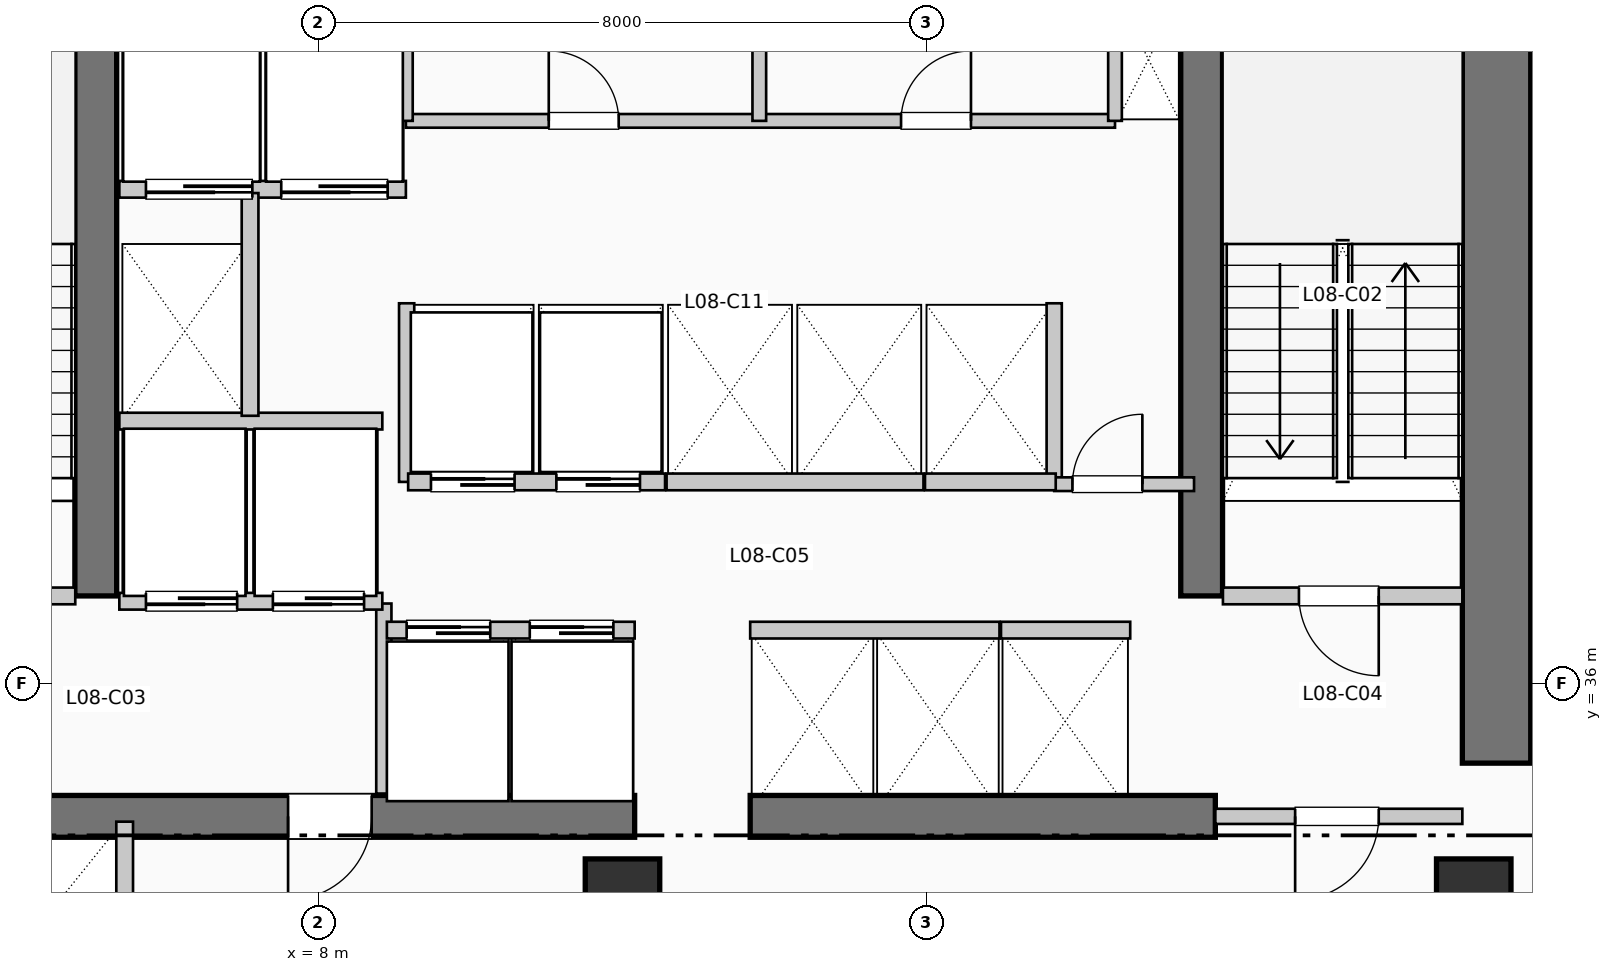
"""IFC4 building model, lengths in metres.
Left out: names, types, materials, properties, quantities, classifications, styles, units other than length and angle.
Written with IfcOpenShell. Run it as: python <this file> out.ifc"""

import sys

from ifc_helpers import new_model, si_unit, direction, frame, frame_2d, origin, origin_2d, place, context, subcontext, project, spatial, rectangle, extrude, element, fill, save


model = new_model("IFC4")
c1 = context("Model", 3, precision=1e-05, world=origin(), true_north=direction((0.0, 1.0)))
c2 = subcontext(c1, "Body", "Model", "MODEL_VIEW")
j1 = project(units=[si_unit("LENGTHUNIT", "METRE"), si_unit("PLANEANGLEUNIT", "RADIAN")], contexts=[c1])
p1 = place(None, origin())
s1 = spatial("IfcSite", under=j1, at=p1, CompositionType="ELEMENT")
p2 = place(p1, origin())
s2 = spatial("IfcBuilding", under=s1, at=p2, CompositionType="ELEMENT")
p3 = place(p2, frame((0.0, 0.0, 38.28)))
s3 = spatial("IfcBuildingStorey", under=s2, at=p3, CompositionType="ELEMENT", Elevation=38.28)
p4 = place(p3, frame((23.5, 34.95, 0.0), z_axis=(0.0, 0.0, 1.0), x_axis=(0.0, 1.0, 0.0)))
e1 = element("IfcWall", 1, at=p4, inside=s3, PredefinedType="SHEAR", context=c2, shape_type="SweptSolid", body=[
    extrude(rectangle(XDim=10.64, YDim=0.9, at=frame_2d((5.32, 0.0))), origin(), (0.0, 0.0, 1.0), 3.96),
])
p5 = place(p3, frame((1.45, 34.25, 0.0), z_axis=(0.0, 0.0, 1.0), x_axis=(1.0, 0.0, 0.0)))
e2 = element("IfcWall", 2, at=p5, inside=s3, PredefinedType="SHEAR", context=c2, shape_type="SweptSolid", body=[
    extrude(rectangle(XDim=10.71, YDim=0.55, at=frame_2d((5.355, 0.0))), origin(), (0.0, 0.0, 1.0), 3.96),
])
p6 = place(p5, frame((7.25, 0.0, 0.0), z_axis=(0.0, 0.0, 1.0), x_axis=(-1.0, 0.0, 0.0)))
e3 = element("IfcOpeningElement", 3, at=p6, cuts=e2, PredefinedType="OPENING", context=c2, shape_type="SweptSolid", body=[
    extrude(rectangle(XDim=1.1, YDim=2.15, at=frame_2d((0.55, 1.075))), frame((0.0, 0.285, 0.0), z_axis=(0.0, -1.0, 0.0), x_axis=(1.0, 0.0, 0.0)), (0.0, 0.0, 1.0), 0.57),
])
p7 = place(p3, frame((13.68, 34.25, 0.0), z_axis=(0.0, 0.0, 1.0), x_axis=(1.0, 0.0, 0.0)))
e4 = element("IfcWall", 4, at=p7, inside=s3, PredefinedType="SHEAR", context=c2, shape_type="SweptSolid", body=[
    extrude(rectangle(XDim=6.12, YDim=0.55, at=frame_2d((3.06, 0.0))), origin(), (0.0, 0.0, 1.0), 3.96),
])
for number, where, z_axis, x_axis in (
    (5, (5.07, 37.15, 0.0), (0.0, 0.0, 1.0), (0.0, 1.0, 0.0)),
    (6, (19.62, 37.15, 0.0), (0.0, 0.0, 1.0), (0.0, 1.0, 0.0)),
):
    element("IfcWall", number, at=place(p3, frame(where, z_axis=z_axis, x_axis=x_axis)), inside=s3, PredefinedType="SHEAR", context=c2, shape_type="SweptSolid", body=[
        extrude(rectangle(XDim=7.89, YDim=0.55, at=frame_2d((3.945, 0.0))), origin(), (0.0, 0.0, 1.0), 3.96),
    ])
for number, where, z_axis, x_axis in (
    (7, (12.0, 33.2, 0.0), (0.0, 0.0, 1.0), (1.0, 0.0, 0.0)),
    (8, (23.2, 33.2, 0.0), (0.0, 0.0, 1.0), (1.0, 0.0, 0.0)),
):
    element("IfcColumn", number, at=place(p3, frame(where, z_axis=z_axis, x_axis=x_axis)), inside=s3, PredefinedType="COLUMN", context=c2, shape_type="SweptSolid", body=[
        extrude(rectangle(XDim=0.98, YDim=0.98, at=origin_2d()), origin(), (0.0, 0.0, 1.0), 3.96),
    ])
p8 = place(p3, frame((1.65, 37.15, 0.0), z_axis=(0.0, 0.0, 1.0), x_axis=(1.0, 0.0, 0.0)))
e9 = element("IfcWall", 9, at=p8, inside=s3, PredefinedType="PARTITIONING", context=c2, shape_type="SweptSolid", body=[
    extrude(rectangle(XDim=3.15, YDim=0.22, at=frame_2d((1.575, 0.0))), origin(), (0.0, 0.0, 1.0), 3.71),
])
p9 = place(p8, frame((2.05, 0.0, 0.0), z_axis=(0.0, 0.0, 1.0), x_axis=(-1.0, 0.0, 0.0)))
e10 = element("IfcOpeningElement", 10, at=p9, cuts=e9, PredefinedType="OPENING", context=c2, shape_type="SweptSolid", body=[
    extrude(rectangle(XDim=1.05, YDim=2.15, at=frame_2d((0.525, 1.075))), frame((0.0, 0.12, 0.0), z_axis=(0.0, -1.0, 0.0), x_axis=(1.0, 0.0, 0.0)), (0.0, 0.0, 1.0), 0.24),
])
p10 = place(p3, frame((8.86, 34.55, 0.0), z_axis=(0.0, 0.0, 1.0), x_axis=(0.0, 1.0, 0.0)))
e11 = element("IfcWall", 11, at=p10, inside=s3, PredefinedType="PARTITIONING", context=c2, shape_type="SweptSolid", body=[
    extrude(rectangle(XDim=2.5, YDim=0.2, at=frame_2d((1.25, 0.0))), origin(), (0.0, 0.0, 1.0), 3.71),
])
p11 = place(p3, frame((19.9, 37.15, 0.0), z_axis=(0.0, 0.0, 1.0), x_axis=(1.0, 0.0, 0.0)))
e12 = element("IfcWall", 12, at=p11, inside=s3, PredefinedType="PARTITIONING", context=c2, shape_type="SweptSolid", body=[
    extrude(rectangle(XDim=3.15, YDim=0.22, at=frame_2d((1.575, 0.0))), origin(), (0.0, 0.0, 1.0), 3.71),
])
p12 = place(p11, frame((2.05, 0.0, 0.0), z_axis=(0.0, 0.0, 1.0), x_axis=(-1.0, 0.0, 0.0)))
e13 = element("IfcOpeningElement", 13, at=p12, cuts=e12, PredefinedType="OPENING", context=c2, shape_type="SweptSolid", body=[
    extrude(rectangle(XDim=1.05, YDim=2.15, at=frame_2d((0.525, 1.075))), frame((0.0, 0.12, 0.0), z_axis=(0.0, -1.0, 0.0), x_axis=(1.0, 0.0, 0.0)), (0.0, 0.0, 1.0), 0.24),
])
p13 = place(p3, frame((19.8, 34.25, 0.0), z_axis=(0.0, 0.0, 1.0), x_axis=(1.0, 0.0, 0.0)))
e14 = element("IfcWall", 14, at=p13, inside=s3, PredefinedType="PARTITIONING", context=c2, shape_type="SweptSolid", body=[
    extrude(rectangle(XDim=3.25, YDim=0.2, at=frame_2d((1.625, 0.0))), origin(), (0.0, 0.0, 1.0), 3.71),
])
p14 = place(p13, frame((2.15, 0.0, 0.0), z_axis=(0.0, 0.0, 1.0), x_axis=(-1.0, 0.0, 0.0)))
e15 = element("IfcOpeningElement", 15, at=p14, cuts=e14, PredefinedType="OPENING", context=c2, shape_type="SweptSolid", body=[
    extrude(rectangle(XDim=1.1, YDim=2.15, at=frame_2d((0.55, 1.075))), frame((0.0, 0.11, 0.0), z_axis=(0.0, -1.0, 0.0), x_axis=(1.0, 0.0, 0.0)), (0.0, 0.0, 1.0), 0.22),
])
p15 = place(p3, frame((5.38, 37.08, 0.0), z_axis=(0.0, 0.0, 1.0), x_axis=(1.0, 0.0, 0.0)))
e16 = element("IfcWall", 16, at=p15, inside=s3, PredefinedType="PARTITIONING", context=c2, shape_type="SweptSolid", body=[
    extrude(rectangle(XDim=3.46, YDim=0.22, at=frame_2d((1.73, 0.0))), origin(), (0.0, 0.0, 1.0), 3.71),
])
p16 = place(p15, frame((1.55, 0.0, 0.0), z_axis=(0.0, 0.0, 1.0), x_axis=(-1.0, 0.0, 0.0)))
e17 = element("IfcOpeningElement", 17, at=p16, cuts=e16, PredefinedType="OPENING", context=c2, shape_type="SweptSolid", body=[
    extrude(rectangle(XDim=1.2, YDim=2.2, at=frame_2d((0.6, 1.1))), frame((0.0, 0.12, 0.0), z_axis=(0.0, -1.0, 0.0), x_axis=(1.0, 0.0, 0.0)), (0.0, 0.0, 1.0), 0.24),
])
p17 = place(p15, frame((3.22, 0.0, 0.0), z_axis=(0.0, 0.0, 1.0), x_axis=(-1.0, 0.0, 0.0)))
e18 = element("IfcOpeningElement", 18, at=p17, cuts=e16, PredefinedType="OPENING", context=c2, shape_type="SweptSolid", body=[
    extrude(rectangle(XDim=1.2, YDim=2.2, at=frame_2d((0.6, 1.1))), frame((0.0, 0.12, 0.0), z_axis=(0.0, -1.0, 0.0), x_axis=(1.0, 0.0, 0.0)), (0.0, 0.0, 1.0), 0.24),
])
p18 = place(p3, frame((5.38, 39.45, 0.0), z_axis=(0.0, 0.0, 1.0), x_axis=(1.0, 0.0, 0.0)))
e19 = element("IfcWall", 19, at=p18, inside=s3, PredefinedType="PARTITIONING", context=c2, shape_type="SweptSolid", body=[
    extrude(rectangle(XDim=3.46, YDim=0.22, at=frame_2d((1.73, 0.0))), origin(), (0.0, 0.0, 1.0), 3.71),
])
p19 = place(p3, frame((5.38, 42.5, 0.0), z_axis=(0.0, 0.0, 1.0), x_axis=(1.0, 0.0, 0.0)))
e20 = element("IfcWall", 20, at=p19, inside=s3, PredefinedType="PARTITIONING", context=c2, shape_type="SweptSolid", body=[
    extrude(rectangle(XDim=3.77, YDim=0.22, at=frame_2d((1.885, 0.0))), origin(), (0.0, 0.0, 1.0), 3.71),
])
p20 = place(p19, frame((1.75, 0.0, 0.0), z_axis=(0.0, 0.0, 1.0), x_axis=(-1.0, 0.0, 0.0)))
e21 = element("IfcOpeningElement", 21, at=p20, cuts=e20, PredefinedType="OPENING", context=c2, shape_type="SweptSolid", body=[
    extrude(rectangle(XDim=1.4, YDim=2.2, at=frame_2d((0.7, 1.1))), frame((0.0, 0.12, 0.0), z_axis=(0.0, -1.0, 0.0), x_axis=(1.0, 0.0, 0.0)), (0.0, 0.0, 1.0), 0.24),
])
p21 = place(p19, frame((3.53, 0.0, 0.0), z_axis=(0.0, 0.0, 1.0), x_axis=(-1.0, 0.0, 0.0)))
e22 = element("IfcOpeningElement", 22, at=p21, cuts=e20, PredefinedType="OPENING", context=c2, shape_type="SweptSolid", body=[
    extrude(rectangle(XDim=1.4, YDim=2.2, at=frame_2d((0.7, 1.1))), frame((0.0, 0.12, 0.0), z_axis=(0.0, -1.0, 0.0), x_axis=(1.0, 0.0, 0.0)), (0.0, 0.0, 1.0), 0.24),
])
p22 = place(p3, frame((7.1, 39.52, 0.0), z_axis=(0.0, 0.0, 1.0), x_axis=(0.0, 1.0, 0.0)))
e23 = element("IfcWall", 23, at=p22, inside=s3, PredefinedType="PARTITIONING", context=c2, shape_type="SweptSolid", body=[
    extrude(rectangle(XDim=2.93, YDim=0.22, at=frame_2d((1.465, 0.0))), origin(), (0.0, 0.0, 1.0), 3.71),
])
p23 = place(p3, frame((5.45, 31.8, 0.0), z_axis=(0.0, 0.0, 1.0), x_axis=(0.0, 1.0, 0.0)))
e24 = element("IfcWall", 24, at=p23, inside=s3, PredefinedType="PARTITIONING", context=c2, shape_type="SweptSolid", body=[
    extrude(rectangle(XDim=2.38, YDim=0.22, at=frame_2d((1.19, 0.0))), origin(), (0.0, 0.0, 1.0), 3.71),
])
for number, where, z_axis, x_axis in (
    (25, (9.16, 38.65, 0.0), (0.0, 0.0, 1.0), (0.0, 1.0, 0.0)),
    (26, (17.68, 38.65, 0.0), (0.0, 0.0, 1.0), (0.0, 1.0, 0.0)),
):
    element("IfcWall", number, at=place(p3, frame(where, z_axis=z_axis, x_axis=x_axis)), inside=s3, PredefinedType="PARTITIONING", context=c2, shape_type="SweptSolid", body=[
        extrude(rectangle(XDim=2.35, YDim=0.2, at=frame_2d((1.175, 0.0))), origin(), (0.0, 0.0, 1.0), 3.71),
    ])
p24 = place(p3, frame((17.68, 38.62, 0.0), z_axis=(0.0, 0.0, 1.0), x_axis=(1.0, 0.0, 0.0)))
e27 = element("IfcWall", 27, at=p24, inside=s3, PredefinedType="PARTITIONING", context=c2, shape_type="SweptSolid", body=[
    extrude(rectangle(XDim=1.84, YDim=0.18, at=frame_2d((0.92, 0.0))), origin(), (0.0, 0.0, 1.0), 3.71),
])
p25 = place(p24, frame((0.24, 0.0, 0.0)))
e28 = element("IfcOpeningElement", 28, at=p25, cuts=e27, PredefinedType="OPENING", context=c2, shape_type="SweptSolid", body=[
    extrude(rectangle(XDim=0.92, YDim=2.1, at=frame_2d((0.46, 1.05))), frame((0.0, 0.1, 0.0), z_axis=(0.0, -1.0, 0.0), x_axis=(1.0, 0.0, 0.0)), (0.0, 0.0, 1.0), 0.2),
])
p26 = place(p3, frame((8.9, 36.7, 0.0), z_axis=(0.0, 0.0, 1.0), x_axis=(1.0, 0.0, 0.0)))
e29 = element("IfcWall", 29, at=p26, inside=s3, PredefinedType="PARTITIONING", context=c2, shape_type="SweptSolid", body=[
    extrude(rectangle(XDim=3.26, YDim=0.22, at=frame_2d((1.63, 0.0))), origin(), (0.0, 0.0, 1.0), 3.71),
])
p27 = place(p26, frame((0.26, 0.0, 0.0)))
e30 = element("IfcOpeningElement", 30, at=p27, cuts=e29, PredefinedType="OPENING", context=c2, shape_type="SweptSolid", body=[
    extrude(rectangle(XDim=1.1, YDim=2.2, at=frame_2d((0.55, 1.1))), frame((0.0, 0.12, 0.0), z_axis=(0.0, -1.0, 0.0), x_axis=(1.0, 0.0, 0.0)), (0.0, 0.0, 1.0), 0.24),
])
p28 = place(p26, frame((1.88, 0.0, 0.0)))
e31 = element("IfcOpeningElement", 31, at=p28, cuts=e29, PredefinedType="OPENING", context=c2, shape_type="SweptSolid", body=[
    extrude(rectangle(XDim=1.1, YDim=2.2, at=frame_2d((0.55, 1.1))), frame((0.0, 0.12, 0.0), z_axis=(0.0, -1.0, 0.0), x_axis=(1.0, 0.0, 0.0)), (0.0, 0.0, 1.0), 0.24),
])
p29 = place(p3, frame((9.18, 38.65, 0.0), z_axis=(0.0, 0.0, 1.0), x_axis=(1.0, 0.0, 0.0)))
e32 = element("IfcWall", 32, at=p29, inside=s3, PredefinedType="PARTITIONING", context=c2, shape_type="SweptSolid", body=[
    extrude(rectangle(XDim=3.38, YDim=0.22, at=frame_2d((1.69, 0.0))), origin(), (0.0, 0.0, 1.0), 3.71),
])
p30 = place(p29, frame((0.3, 0.0, 0.0)))
e33 = element("IfcOpeningElement", 33, at=p30, cuts=e32, PredefinedType="OPENING", context=c2, shape_type="SweptSolid", body=[
    extrude(rectangle(XDim=1.1, YDim=2.2, at=frame_2d((0.55, 1.1))), frame((0.0, 0.12, 0.0), z_axis=(0.0, -1.0, 0.0), x_axis=(1.0, 0.0, 0.0)), (0.0, 0.0, 1.0), 0.24),
])
p31 = place(p29, frame((1.95, 0.0, 0.0)))
e34 = element("IfcOpeningElement", 34, at=p31, cuts=e32, PredefinedType="OPENING", context=c2, shape_type="SweptSolid", body=[
    extrude(rectangle(XDim=1.1, YDim=2.2, at=frame_2d((0.55, 1.1))), frame((0.0, 0.12, 0.0), z_axis=(0.0, -1.0, 0.0), x_axis=(1.0, 0.0, 0.0)), (0.0, 0.0, 1.0), 0.24),
])
p32 = place(p3, frame((13.68, 36.7, 0.0), z_axis=(0.0, 0.0, 1.0), x_axis=(1.0, 0.0, 0.0)))
e35 = element("IfcWall", 35, at=p32, inside=s3, PredefinedType="PARTITIONING", context=c2, shape_type="SweptSolid", body=[
    extrude(rectangle(XDim=3.28, YDim=0.22, at=frame_2d((1.64, 0.0))), origin(), (0.0, 0.0, 1.0), 3.71),
])
p33 = place(p3, frame((12.58, 38.65, 0.0), z_axis=(0.0, 0.0, 1.0), x_axis=(1.0, 0.0, 0.0)))
e36 = element("IfcWall", 36, at=p33, inside=s3, PredefinedType="PARTITIONING", context=c2, shape_type="SweptSolid", body=[
    extrude(rectangle(XDim=3.38, YDim=0.22, at=frame_2d((1.69, 0.0))), origin(), (0.0, 0.0, 1.0), 3.71),
])
p34 = place(p3, frame((16.98, 36.7, 0.0), z_axis=(0.0, 0.0, 1.0), x_axis=(1.0, 0.0, 0.0)))
e37 = element("IfcWall", 37, at=p34, inside=s3, PredefinedType="PARTITIONING", context=c2, shape_type="SweptSolid", body=[
    extrude(rectangle(XDim=1.7, YDim=0.22, at=frame_2d((0.85, 0.0))), origin(), (0.0, 0.0, 1.0), 3.71),
])
p35 = place(p3, frame((15.98, 38.65, 0.0), z_axis=(0.0, 0.0, 1.0), x_axis=(1.0, 0.0, 0.0)))
e38 = element("IfcWall", 38, at=p35, inside=s3, PredefinedType="PARTITIONING", context=c2, shape_type="SweptSolid", body=[
    extrude(rectangle(XDim=1.72, YDim=0.22, at=frame_2d((0.86, 0.0))), origin(), (0.0, 0.0, 1.0), 3.71),
])
p36 = place(p3, frame((9.15, 43.4, 0.0), z_axis=(0.0, 0.0, 1.0), x_axis=(1.0, 0.0, 0.0)))
e39 = element("IfcWall", 39, at=p36, inside=s3, PredefinedType="PLUMBINGWALL", context=c2, shape_type="SweptSolid", body=[
    extrude(rectangle(XDim=9.33, YDim=0.18, at=frame_2d((4.665, 0.0))), origin(), (0.0, 0.0, 1.0), 3.71),
])
p37 = place(p36, frame((1.88, 0.0, 0.0)))
e40 = element("IfcOpeningElement", 40, at=p37, cuts=e39, PredefinedType="OPENING", context=c2, shape_type="SweptSolid", body=[
    extrude(rectangle(XDim=0.92, YDim=2.1, at=frame_2d((0.46, 1.05))), frame((0.0, 0.1, 0.0), z_axis=(0.0, -1.0, 0.0), x_axis=(1.0, 0.0, 0.0)), (0.0, 0.0, 1.0), 0.2),
])
p38 = place(p36, frame((6.515, 0.0, 0.0)))
e41 = element("IfcOpeningElement", 41, at=p38, cuts=e39, PredefinedType="OPENING", context=c2, shape_type="SweptSolid", body=[
    extrude(rectangle(XDim=0.92, YDim=2.1, at=frame_2d((0.46, 1.05))), frame((0.0, 0.1, 0.0), z_axis=(0.0, -1.0, 0.0), x_axis=(1.0, 0.0, 0.0)), (0.0, 0.0, 1.0), 0.2),
])
for number, where, z_axis, x_axis in (
    (42, (9.15, 43.4, 0.0), (0.0, 0.0, 1.0), (0.0, 1.0, 0.0)),
    (43, (18.48, 43.4, 0.0), (0.0, 0.0, 1.0), (0.0, 1.0, 0.0)),
    (44, (13.8, 43.4, 0.0), (0.0, 0.0, 1.0), (0.0, 1.0, 0.0)),
):
    element("IfcWall", number, at=place(p3, frame(where, z_axis=z_axis, x_axis=x_axis)), inside=s3, PredefinedType="PLUMBINGWALL", context=c2, shape_type="SweptSolid", body=[
        extrude(rectangle(XDim=1.88, YDim=0.18, at=frame_2d((0.94, 0.0))), origin(), (0.0, 0.0, 1.0), 3.71),
    ])
p39 = place(p6, origin())
e45 = element("IfcDoor", 45, at=p39, inside=s3, OperationType="SINGLE_SWING_LEFT", PredefinedType="DOOR", context=c2, shape_type="SweptSolid", body=[
    extrude(rectangle(XDim=1.1, YDim=2.15, at=frame_2d((0.55, 1.075))), frame((0.0, 0.025, 0.0), z_axis=(0.0, -1.0, 0.0), x_axis=(1.0, 0.0, 0.0)), (0.0, 0.0, 1.0), 0.05),
])
fill(e3, e45)
p40 = place(p12, origin())
e46 = element("IfcDoor", 46, at=p40, inside=s3, OperationType="SINGLE_SWING_RIGHT", PredefinedType="DOOR", context=c2, shape_type="SweptSolid", body=[
    extrude(rectangle(XDim=1.05, YDim=2.15, at=frame_2d((0.525, 1.075))), frame((0.0, 0.025, 0.0), z_axis=(0.0, -1.0, 0.0), x_axis=(1.0, 0.0, 0.0)), (0.0, 0.0, 1.0), 0.05),
])
fill(e13, e46)
p41 = place(p14, origin())
e47 = element("IfcDoor", 47, at=p41, inside=s3, OperationType="SINGLE_SWING_LEFT", PredefinedType="DOOR", context=c2, shape_type="SweptSolid", body=[
    extrude(rectangle(XDim=1.1, YDim=2.15, at=frame_2d((0.55, 1.075))), frame((0.0, 0.025, 0.0), z_axis=(0.0, -1.0, 0.0), x_axis=(1.0, 0.0, 0.0)), (0.0, 0.0, 1.0), 0.05),
])
fill(e15, e47)
p42 = place(p16, origin())
e48 = element("IfcDoor", 48, at=p42, inside=s3, OperationType="SLIDING_TO_RIGHT", PredefinedType="DOOR", context=c2, shape_type="SweptSolid", body=[
    extrude(rectangle(XDim=1.2, YDim=2.2, at=frame_2d((0.6, 1.1))), frame((0.0, 0.025, 0.0), z_axis=(0.0, -1.0, 0.0), x_axis=(1.0, 0.0, 0.0)), (0.0, 0.0, 1.0), 0.05),
])
fill(e17, e48)
p43 = place(p17, origin())
e49 = element("IfcDoor", 49, at=p43, inside=s3, OperationType="SLIDING_TO_RIGHT", PredefinedType="DOOR", context=c2, shape_type="SweptSolid", body=[
    extrude(rectangle(XDim=1.2, YDim=2.2, at=frame_2d((0.6, 1.1))), frame((0.0, 0.025, 0.0), z_axis=(0.0, -1.0, 0.0), x_axis=(1.0, 0.0, 0.0)), (0.0, 0.0, 1.0), 0.05),
])
fill(e18, e49)
p44 = place(p20, origin())
e50 = element("IfcDoor", 50, at=p44, inside=s3, OperationType="SLIDING_TO_LEFT", PredefinedType="DOOR", context=c2, shape_type="SweptSolid", body=[
    extrude(rectangle(XDim=1.4, YDim=2.2, at=frame_2d((0.7, 1.1))), frame((0.0, 0.025, 0.0), z_axis=(0.0, -1.0, 0.0), x_axis=(1.0, 0.0, 0.0)), (0.0, 0.0, 1.0), 0.05),
])
fill(e21, e50)
p45 = place(p21, origin())
e51 = element("IfcDoor", 51, at=p45, inside=s3, OperationType="SLIDING_TO_LEFT", PredefinedType="DOOR", context=c2, shape_type="SweptSolid", body=[
    extrude(rectangle(XDim=1.4, YDim=2.2, at=frame_2d((0.7, 1.1))), frame((0.0, 0.025, 0.0), z_axis=(0.0, -1.0, 0.0), x_axis=(1.0, 0.0, 0.0)), (0.0, 0.0, 1.0), 0.05),
])
fill(e22, e51)
p46 = place(p25, origin())
e52 = element("IfcDoor", 52, at=p46, inside=s3, OperationType="SINGLE_SWING_RIGHT", PredefinedType="DOOR", context=c2, shape_type="SweptSolid", body=[
    extrude(rectangle(XDim=0.92, YDim=2.1, at=frame_2d((0.46, 1.05))), frame((0.0, 0.025, 0.0), z_axis=(0.0, -1.0, 0.0), x_axis=(1.0, 0.0, 0.0)), (0.0, 0.0, 1.0), 0.05),
])
fill(e28, e52)
p47 = place(p27, origin())
e53 = element("IfcDoor", 53, at=p47, inside=s3, OperationType="SLIDING_TO_LEFT", PredefinedType="DOOR", context=c2, shape_type="SweptSolid", body=[
    extrude(rectangle(XDim=1.1, YDim=2.2, at=frame_2d((0.55, 1.1))), frame((0.0, 0.025, 0.0), z_axis=(0.0, -1.0, 0.0), x_axis=(1.0, 0.0, 0.0)), (0.0, 0.0, 1.0), 0.05),
])
fill(e30, e53)
p48 = place(p28, origin())
e54 = element("IfcDoor", 54, at=p48, inside=s3, OperationType="SLIDING_TO_LEFT", PredefinedType="DOOR", context=c2, shape_type="SweptSolid", body=[
    extrude(rectangle(XDim=1.1, YDim=2.2, at=frame_2d((0.55, 1.1))), frame((0.0, 0.025, 0.0), z_axis=(0.0, -1.0, 0.0), x_axis=(1.0, 0.0, 0.0)), (0.0, 0.0, 1.0), 0.05),
])
fill(e31, e54)
p49 = place(p30, origin())
e55 = element("IfcDoor", 55, at=p49, inside=s3, OperationType="SLIDING_TO_LEFT", PredefinedType="DOOR", context=c2, shape_type="SweptSolid", body=[
    extrude(rectangle(XDim=1.1, YDim=2.2, at=frame_2d((0.55, 1.1))), frame((0.0, 0.025, 0.0), z_axis=(0.0, -1.0, 0.0), x_axis=(1.0, 0.0, 0.0)), (0.0, 0.0, 1.0), 0.05),
])
fill(e33, e55)
p50 = place(p31, origin())
e56 = element("IfcDoor", 56, at=p50, inside=s3, OperationType="SLIDING_TO_LEFT", PredefinedType="DOOR", context=c2, shape_type="SweptSolid", body=[
    extrude(rectangle(XDim=1.1, YDim=2.2, at=frame_2d((0.55, 1.1))), frame((0.0, 0.025, 0.0), z_axis=(0.0, -1.0, 0.0), x_axis=(1.0, 0.0, 0.0)), (0.0, 0.0, 1.0), 0.05),
])
fill(e34, e56)
p51 = place(p37, origin())
e57 = element("IfcDoor", 57, at=p51, inside=s3, OperationType="SINGLE_SWING_LEFT", PredefinedType="DOOR", context=c2, shape_type="SweptSolid", body=[
    extrude(rectangle(XDim=0.92, YDim=2.1, at=frame_2d((0.46, 1.05))), frame((0.0, 0.025, 0.0), z_axis=(0.0, -1.0, 0.0), x_axis=(1.0, 0.0, 0.0)), (0.0, 0.0, 1.0), 0.05),
])
fill(e40, e57)
p52 = place(p38, origin())
e58 = element("IfcDoor", 58, at=p52, inside=s3, OperationType="SINGLE_SWING_RIGHT", PredefinedType="DOOR", context=c2, shape_type="SweptSolid", body=[
    extrude(rectangle(XDim=0.92, YDim=2.1, at=frame_2d((0.46, 1.05))), frame((0.0, 0.025, 0.0), z_axis=(0.0, -1.0, 0.0), x_axis=(1.0, 0.0, 0.0)), (0.0, 0.0, 1.0), 0.05),
])
fill(e41, e58)
save(model, sys.argv[1])
